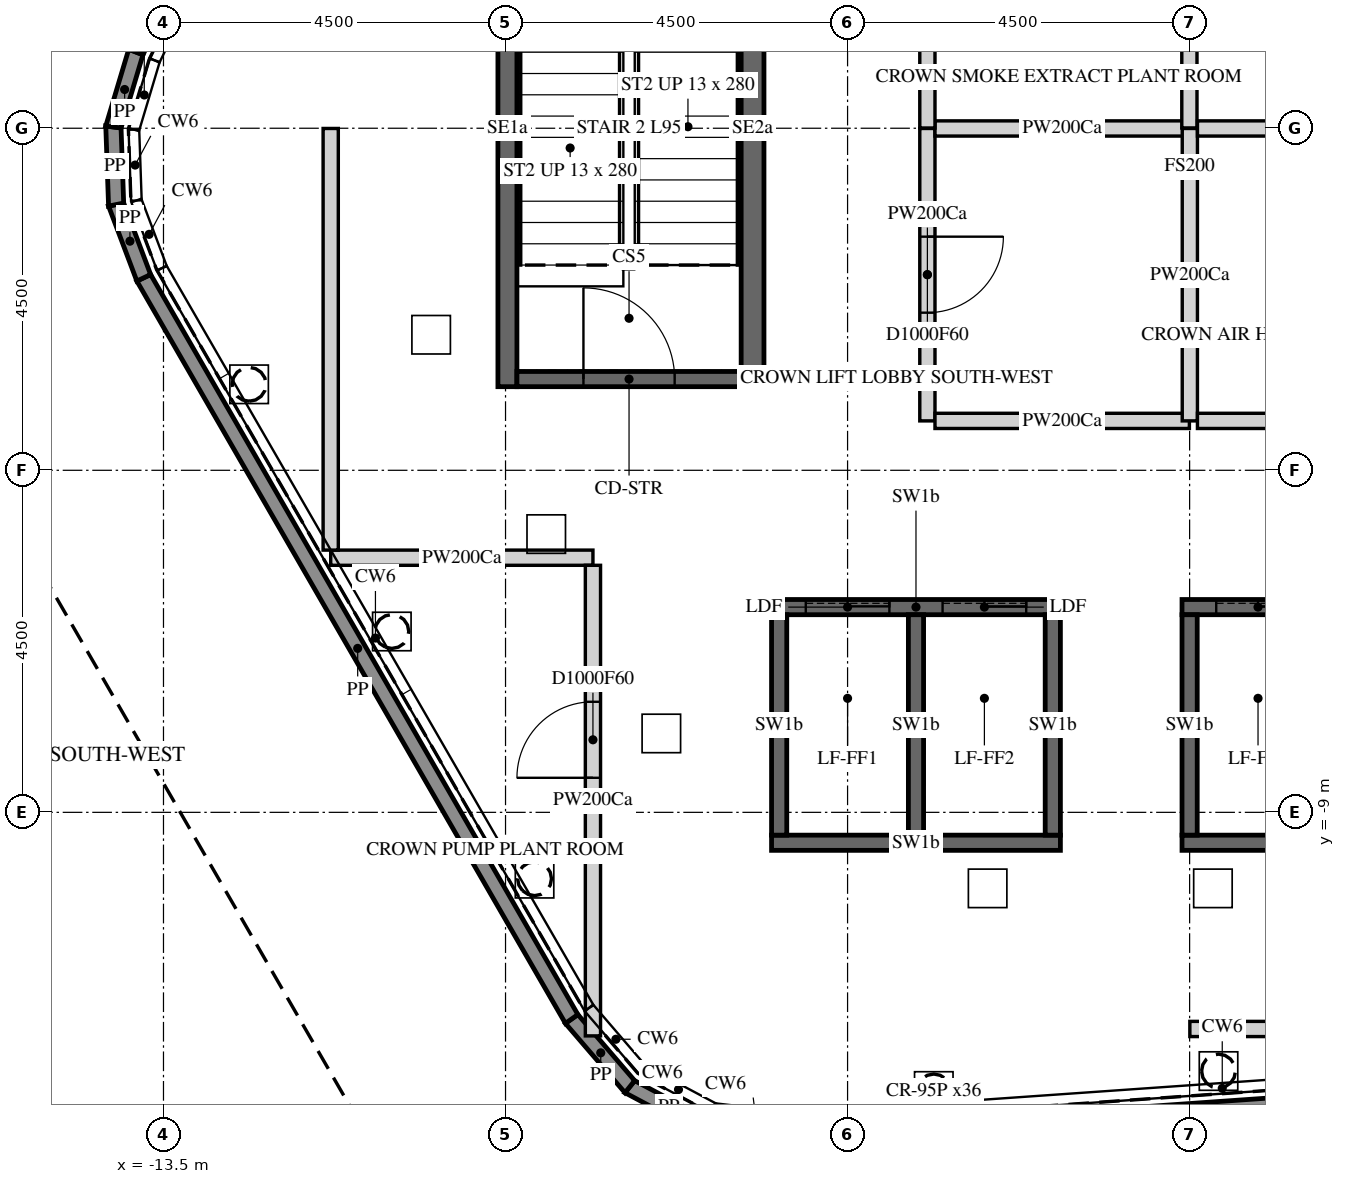
"""IFC4 building model, lengths in metres.
Left out: names, types, materials, properties, quantities, classifications, styles, units other than length and angle.
Written with IfcOpenShell. Run it as: python <this file> out.ifc"""

import sys

from ifc_helpers import new_model, si_unit, direction, frame, frame_2d, origin, place, context, subcontext, project, spatial, polyline, rectangle, outline, extrude, element, fill, save


model = new_model("IFC4")
c1 = context("Model", 3, precision=1e-05, world=origin(), true_north=direction((0.0, 1.0)))
c2 = subcontext(c1, "Body", "Model", "MODEL_VIEW")
j1 = project(units=[si_unit("LENGTHUNIT", "METRE"), si_unit("PLANEANGLEUNIT", "RADIAN")], contexts=[c1])
p1 = place(None, origin())
s1 = spatial("IfcSite", under=j1, at=p1, CompositionType="ELEMENT")
p2 = place(p1, origin())
s2 = spatial("IfcBuilding", under=s1, at=p2, CompositionType="ELEMENT")
p3 = place(p2, frame((0.0, 0.0, 401.7)))
s3 = spatial("IfcBuildingStorey", under=s2, at=p3, CompositionType="ELEMENT", Elevation=401.7)
p4 = place(p3, frame((6.063, -12.508, 4.5), z_axis=(0.0, 0.0, 1.0), x_axis=(-0.997564024583, -0.069756840932, 0.0)))
e1 = element("IfcWall", 1, at=p4, inside=s3, PredefinedType="PARAPET", context=c2, shape_type="SweptSolid", body=[
    extrude(outline(polyline([(0.008, -0.1), (11.25, -0.1), (11.268, 0.1), (-0.008, 0.1), (0.008, -0.1)])), origin(), (0.0, 0.0, 1.0), 1.1),
])
p5 = place(p3, frame((-6.335, -13.156, 4.5), z_axis=(0.0, 0.0, 1.0), x_axis=(-0.88296107381, 0.469446207926, 0.0)))
e2 = element("IfcWall", 2, at=p5, inside=s3, PredefinedType="PARAPET", context=c2, shape_type="SweptSolid", body=[
    extrude(outline(polyline([(0.019, -0.1), (1.147, -0.1), (1.184, 0.1), (-0.019, 0.1), (0.019, -0.1)])), origin(), (0.0, 0.0, 1.0), 1.1),
])
p6 = place(p3, frame((-7.365, -12.609, 4.5), z_axis=(0.0, 0.0, 1.0), x_axis=(-0.651680826734, 0.758493309177, 0.0)))
e3 = element("IfcWall", 3, at=p6, inside=s3, PredefinedType="PARAPET", context=c2, shape_type="SweptSolid", body=[
    extrude(outline(polyline([(0.019, -0.1), (1.166, -0.1), (1.184, 0.1), (-0.019, 0.1), (0.019, -0.1)])), origin(), (0.0, 0.0, 1.0), 1.1),
])
p7 = place(p3, frame((-8.13, -11.718, 4.5), z_axis=(0.0, 0.0, 1.0), x_axis=(-0.500003376122, 0.866023454571, 0.0)))
e4 = element("IfcWall", 4, at=p7, inside=s3, PredefinedType="PARAPET", context=c2, shape_type="SweptSolid", body=[
    extrude(outline(polyline([(0.009, -0.1), (11.251, -0.1), (11.267, 0.1), (-0.009, 0.1), (0.009, -0.1)])), origin(), (0.0, 0.0, 1.0), 1.1),
])
p8 = place(p3, frame((-13.76, -1.968, 4.5), z_axis=(0.0, 0.0, 1.0), x_axis=(-0.352837928655, 0.935684453276, 0.0)))
e5 = element("IfcWall", 5, at=p8, inside=s3, PredefinedType="PARAPET", context=c2, shape_type="SweptSolid", body=[
    extrude(outline(polyline([(0.008, -0.1), (1.013, -0.1), (1.046, 0.1), (-0.008, 0.1), (0.008, -0.1)])), origin(), (0.0, 0.0, 1.0), 1.1),
])
p9 = place(p3, frame((-14.123, -1.004, 4.5), z_axis=(0.0, 0.0, 1.0), x_axis=(-0.034898604471, 0.999390858176, 0.0)))
e6 = element("IfcWall", 6, at=p9, inside=s3, PredefinedType="PARAPET", context=c2, shape_type="SweptSolid", body=[
    extrude(outline(polyline([(0.016, -0.1), (1.005, -0.1), (1.038, 0.1), (-0.016, 0.1), (0.016, -0.1)])), origin(), (0.0, 0.0, 1.0), 1.1),
])
p10 = place(p3, frame((-14.159, 0.017, 4.5), z_axis=(0.0, 0.0, 1.0), x_axis=(0.286695156131, 0.958021861677, 0.0)))
e7 = element("IfcWall", 7, at=p10, inside=s3, PredefinedType="PARAPET", context=c2, shape_type="SweptSolid", body=[
    extrude(outline(polyline([(0.016, -0.1), (1.021, -0.1), (1.038, 0.1), (-0.016, 0.1), (0.016, -0.1)])), origin(), (0.0, 0.0, 1.0), 1.1),
])
p11 = place(p3, frame((-13.864, 1.003, 4.5), z_axis=(0.0, 0.0, 1.0), x_axis=(0.438379628459, 0.898789909463, 0.0)))
e8 = element("IfcWall", 8, at=p11, inside=s3, PredefinedType="PARAPET", context=c2, shape_type="SweptSolid", body=[
    extrude(outline(polyline([(0.008, -0.1), (11.25, -0.1), (11.269, 0.1), (-0.008, 0.1), (0.008, -0.1)])), origin(), (0.0, 0.0, 1.0), 1.1),
])
p12 = place(p3, frame((-5.5, -6.3, -0.2), z_axis=(0.0, 0.0, 1.0), x_axis=(1.0, 0.0, 0.0)))
e9 = element("IfcWall", 9, at=p12, inside=s3, PredefinedType="SHEAR", context=c2, shape_type="SweptSolid", body=[
    extrude(rectangle(XDim=3.8, YDim=0.2, at=frame_2d((1.9, 0.0))), origin(), (0.0, 0.0, 1.0), 4.5),
])
p13 = place(p12, frame((0.45, 0.0, 0.2)))
e10 = element("IfcOpeningElement", 10, at=p13, cuts=e9, PredefinedType="OPENING", context=c2, shape_type="SweptSolid", body=[
    extrude(rectangle(XDim=1.1, YDim=2.1, at=frame_2d((0.55, 1.05))), frame((0.0, 0.11, 0.0), z_axis=(0.0, -1.0, 0.0), x_axis=(1.0, 0.0, 0.0)), (0.0, 0.0, 1.0), 0.22),
])
p14 = place(p12, frame((2.25, 0.0, 0.2)))
e11 = element("IfcOpeningElement", 11, at=p14, cuts=e9, PredefinedType="OPENING", context=c2, shape_type="SweptSolid", body=[
    extrude(rectangle(XDim=1.1, YDim=2.1, at=frame_2d((0.55, 1.05))), frame((0.0, 0.11, 0.0), z_axis=(0.0, -1.0, 0.0), x_axis=(1.0, 0.0, 0.0)), (0.0, 0.0, 1.0), 0.22),
])
p15 = place(p3, frame((-5.5, -9.4, -0.2), z_axis=(0.0, 0.0, 1.0), x_axis=(1.0, 0.0, 0.0)))
e12 = element("IfcWall", 12, at=p15, inside=s3, PredefinedType="SHEAR", context=c2, shape_type="SweptSolid", body=[
    extrude(rectangle(XDim=3.8, YDim=0.2, at=frame_2d((1.9, 0.0))), origin(), (0.0, 0.0, 1.0), 4.5),
])
for number, where, z_axis, x_axis in (
    (13, (-5.4, -9.3, -0.2), (0.0, 0.0, 1.0), (0.0, 1.0, 0.0)),
    (14, (-3.6, -9.3, -0.2), (0.0, 0.0, 1.0), (0.0, 1.0, 0.0)),
    (15, (-1.8, -9.3, -0.2), (0.0, 0.0, 1.0), (0.0, 1.0, 0.0)),
):
    element("IfcWall", number, at=place(p3, frame(where, z_axis=z_axis, x_axis=x_axis)), inside=s3, PredefinedType="SHEAR", context=c2, shape_type="SweptSolid", body=[
        extrude(rectangle(XDim=2.9, YDim=0.2, at=frame_2d((1.45, 0.0))), origin(), (0.0, 0.0, 1.0), 4.5),
    ])
p16 = place(p3, frame((-0.1, -6.3, -0.2), z_axis=(0.0, 0.0, 1.0), x_axis=(1.0, 0.0, 0.0)))
e16 = element("IfcWall", 16, at=p16, inside=s3, PredefinedType="SHEAR", context=c2, shape_type="SweptSolid", body=[
    extrude(rectangle(XDim=2.0, YDim=0.2, at=frame_2d((1.0, 0.0))), origin(), (0.0, 0.0, 1.0), 4.5),
])
p17 = place(p16, frame((0.45, 0.0, 0.2)))
e17 = element("IfcOpeningElement", 17, at=p17, cuts=e16, PredefinedType="OPENING", context=c2, shape_type="SweptSolid", body=[
    extrude(rectangle(XDim=1.1, YDim=2.1, at=frame_2d((0.55, 1.05))), frame((0.0, 0.11, 0.0), z_axis=(0.0, -1.0, 0.0), x_axis=(1.0, 0.0, 0.0)), (0.0, 0.0, 1.0), 0.22),
])
p18 = place(p3, frame((-0.1, -9.4, -0.2), z_axis=(0.0, 0.0, 1.0), x_axis=(1.0, 0.0, 0.0)))
e18 = element("IfcWall", 18, at=p18, inside=s3, PredefinedType="SHEAR", context=c2, shape_type="SweptSolid", body=[
    extrude(rectangle(XDim=2.0, YDim=0.2, at=frame_2d((1.0, 0.0))), origin(), (0.0, 0.0, 1.0), 4.5),
])
p19 = place(p3, frame((0.0, -9.3, -0.2), z_axis=(0.0, 0.0, 1.0), x_axis=(0.0, 1.0, 0.0)))
e19 = element("IfcWall", 19, at=p19, inside=s3, PredefinedType="SHEAR", context=c2, shape_type="SweptSolid", body=[
    extrude(rectangle(XDim=2.9, YDim=0.2, at=frame_2d((1.45, 0.0))), origin(), (0.0, 0.0, 1.0), 4.5),
])
p20 = place(p3, frame((-5.75, -3.4, -0.2), z_axis=(0.0, 0.0, 1.0), x_axis=(0.0, 1.0, 0.0)))
e20 = element("IfcWall", 20, at=p20, inside=s3, PredefinedType="SHEAR", context=c2, shape_type="SweptSolid", body=[
    extrude(rectangle(XDim=6.8, YDim=0.3, at=frame_2d((3.4, 0.0))), origin(), (0.0, 0.0, 1.0), 4.5),
])
p21 = place(p3, frame((-8.975, -3.4, -0.2), z_axis=(0.0, 0.0, 1.0), x_axis=(0.0, 1.0, 0.0)))
e21 = element("IfcWall", 21, at=p21, inside=s3, PredefinedType="SHEAR", context=c2, shape_type="SweptSolid", body=[
    extrude(rectangle(XDim=6.8, YDim=0.25, at=frame_2d((3.4, 0.0))), origin(), (0.0, 0.0, 1.0), 4.5),
])
p22 = place(p3, frame((-8.85, -3.3, -0.2), z_axis=(0.0, 0.0, 1.0), x_axis=(1.0, 0.0, 0.0)))
e22 = element("IfcWall", 22, at=p22, inside=s3, PredefinedType="SHEAR", context=c2, shape_type="SweptSolid", body=[
    extrude(rectangle(XDim=2.95, YDim=0.2, at=frame_2d((1.475, 0.0))), origin(), (0.0, 0.0, 1.0), 4.5),
])
p23 = place(p22, frame((0.875, 0.0, 0.2)))
e23 = element("IfcOpeningElement", 23, at=p23, cuts=e22, PredefinedType="OPENING", context=c2, shape_type="SweptSolid", body=[
    extrude(rectangle(XDim=1.2, YDim=2.4, at=frame_2d((0.6, 1.2))), frame((0.0, 0.11, 0.0), z_axis=(0.0, -1.0, 0.0), x_axis=(1.0, 0.0, 0.0)), (0.0, 0.0, 1.0), 0.22),
])
p24 = place(p3, frame((-11.3, -5.65, 0.0), z_axis=(0.0, 0.0, 1.0), x_axis=(1.0, 0.0, 0.0)))
e24 = element("IfcWall", 24, at=p24, inside=s3, PredefinedType="PARTITIONING", context=c2, shape_type="SweptSolid", body=[
    extrude(rectangle(XDim=3.45, YDim=0.2, at=frame_2d((1.725, 0.0))), origin(), (0.0, 0.0, 1.0), 4.3),
])
p25 = place(p3, frame((-11.3, -0.003, 0.0), z_axis=(0.0, 0.0, 1.0), x_axis=(0.0, -1.0, 0.0)))
e25 = element("IfcWall", 25, at=p25, inside=s3, PredefinedType="PARTITIONING", context=c2, shape_type="SweptSolid", body=[
    extrude(rectangle(XDim=5.547, YDim=0.2, at=frame_2d((2.773, 0.0))), origin(), (0.0, 0.0, 1.0), 4.3),
])
p26 = place(p3, frame((-7.85, -11.941, 0.0), z_axis=(0.0, 0.0, 1.0), x_axis=(0.0, 1.0, 0.0)))
e26 = element("IfcWall", 26, at=p26, inside=s3, PredefinedType="PARTITIONING", context=c2, shape_type="SweptSolid", body=[
    extrude(rectangle(XDim=6.191, YDim=0.2, at=frame_2d((3.095, 0.0))), origin(), (0.0, 0.0, 1.0), 4.3),
])
p27 = place(p26, frame((3.396, 0.0, 0.0)))
e27 = element("IfcOpeningElement", 27, at=p27, cuts=e26, PredefinedType="OPENING", context=c2, shape_type="SweptSolid", body=[
    extrude(rectangle(XDim=1.0, YDim=2.1, at=frame_2d((0.5, 1.05))), frame((0.0, 0.11, 0.0), z_axis=(0.0, -1.0, 0.0), x_axis=(1.0, 0.0, 0.0)), (0.0, 0.0, 1.0), 0.22),
])
p28 = place(p3, frame((-3.45, -0.003, 0.0), z_axis=(0.0, 0.0, 1.0), x_axis=(0.0, -1.0, 0.0)))
e28 = element("IfcWall", 28, at=p28, inside=s3, PredefinedType="PARTITIONING", context=c2, shape_type="SweptSolid", body=[
    extrude(rectangle(XDim=3.847, YDim=0.2, at=frame_2d((1.924, 0.0))), origin(), (0.0, 0.0, 1.0), 4.3),
])
p29 = place(p28, frame((1.424, 0.0, 0.0)))
e29 = element("IfcOpeningElement", 29, at=p29, cuts=e28, PredefinedType="OPENING", context=c2, shape_type="SweptSolid", body=[
    extrude(rectangle(XDim=1.0, YDim=2.1, at=frame_2d((0.5, 1.05))), frame((0.0, 0.11, 0.0), z_axis=(0.0, -1.0, 0.0), x_axis=(1.0, 0.0, 0.0)), (0.0, 0.0, 1.0), 0.22),
])
p30 = place(p3, frame((-3.35, -0.003, 0.0), z_axis=(0.0, 0.0, 1.0), x_axis=(1.0, 0.0, 0.0)))
e30 = element("IfcWall", 30, at=p30, inside=s3, PredefinedType="PARTITIONING", context=c2, shape_type="SweptSolid", body=[
    extrude(rectangle(XDim=3.347, YDim=0.2, at=frame_2d((1.674, 0.0))), origin(), (0.0, 0.0, 1.0), 4.3),
])
p31 = place(p3, frame((-3.45, 0.003, 0.0), z_axis=(0.0, 0.0, 1.0), x_axis=(0.0, 1.0, 0.0)))
e31 = element("IfcWall", 31, at=p31, inside=s3, PredefinedType="PARTITIONING", context=c2, shape_type="SweptSolid", body=[
    extrude(rectangle(XDim=5.647, YDim=0.2, at=frame_2d((2.823, 0.0))), origin(), (0.0, 0.0, 1.0), 4.3),
])
p32 = place(p3, frame((-0.003, -3.85, 0.0), z_axis=(0.0, 0.0, 1.0), x_axis=(-1.0, 0.0, 0.0)))
e32 = element("IfcWall", 32, at=p32, inside=s3, PredefinedType="PARTITIONING", context=c2, shape_type="SweptSolid", body=[
    extrude(rectangle(XDim=3.347, YDim=0.2, at=frame_2d((1.674, 0.0))), origin(), (0.0, 0.0, 1.0), 4.3),
])
p33 = place(p3, frame((-0.003, 12.9, 0.0), z_axis=(0.0, 0.0, 1.0), x_axis=(0.0, -1.0, 0.0)))
e33 = element("IfcWall", 33, at=p33, inside=s3, PredefinedType="PARTITIONING", context=c2, shape_type="SweptSolid", body=[
    extrude(rectangle(XDim=12.897, YDim=0.2, at=frame_2d((6.448, 0.0))), origin(), (0.0, 0.0, 1.0), 4.3),
])
p34 = place(p3, frame((0.003, -11.85, 0.0), z_axis=(0.0, 0.0, 1.0), x_axis=(1.0, 0.0, 0.0)))
e34 = element("IfcWall", 34, at=p34, inside=s3, PredefinedType="PARTITIONING", context=c2, shape_type="SweptSolid", body=[
    extrude(rectangle(XDim=4.247, YDim=0.2, at=frame_2d((2.124, 0.0))), origin(), (0.0, 0.0, 1.0), 4.3),
])
p35 = place(p3, frame((0.003, -3.85, 0.0), z_axis=(0.0, 0.0, 1.0), x_axis=(0.0, 1.0, 0.0)))
e35 = element("IfcWall", 35, at=p35, inside=s3, PredefinedType="PARTITIONING", context=c2, shape_type="SweptSolid", body=[
    extrude(rectangle(XDim=3.847, YDim=0.2, at=frame_2d((1.924, 0.0))), origin(), (0.0, 0.0, 1.0), 4.3),
])
for number, where, z_axis, x_axis in (
    (36, (0.103, -0.003, 0.0), (0.0, 0.0, 1.0), (1.0, 0.0, 0.0)),
    (37, (3.45, -3.85, 0.0), (0.0, 0.0, 1.0), (-1.0, 0.0, 0.0)),
):
    element("IfcWall", number, at=place(p3, frame(where, z_axis=z_axis, x_axis=x_axis)), inside=s3, PredefinedType="PARTITIONING", context=c2, shape_type="SweptSolid", body=[
        extrude(rectangle(XDim=3.347, YDim=0.2, at=frame_2d((1.673, 0.0))), origin(), (0.0, 0.0, 1.0), 4.3),
    ])
p36 = place(p23, origin())
e38 = element("IfcDoor", 38, at=p36, inside=s3, OperationType="SINGLE_SWING_LEFT", PredefinedType="DOOR", context=c2, shape_type="SweptSolid", body=[
    extrude(rectangle(XDim=1.2, YDim=2.4, at=frame_2d((0.6, 1.2))), frame((0.0, 0.025, 0.0), z_axis=(0.0, -1.0, 0.0), x_axis=(1.0, 0.0, 0.0)), (0.0, 0.0, 1.0), 0.05),
])
fill(e23, e38)
p37 = place(p13, origin())
e39 = element("IfcDoor", 39, at=p37, inside=s3, OperationType="SLIDING_TO_LEFT", PredefinedType="DOOR", context=c2, shape_type="SweptSolid", body=[
    extrude(rectangle(XDim=1.1, YDim=2.1, at=frame_2d((0.55, 1.05))), frame((0.0, 0.025, 0.0), z_axis=(0.0, -1.0, 0.0), x_axis=(1.0, 0.0, 0.0)), (0.0, 0.0, 1.0), 0.05),
])
fill(e10, e39)
p38 = place(p14, origin())
e40 = element("IfcDoor", 40, at=p38, inside=s3, OperationType="SLIDING_TO_LEFT", PredefinedType="DOOR", context=c2, shape_type="SweptSolid", body=[
    extrude(rectangle(XDim=1.1, YDim=2.1, at=frame_2d((0.55, 1.05))), frame((0.0, 0.025, 0.0), z_axis=(0.0, -1.0, 0.0), x_axis=(1.0, 0.0, 0.0)), (0.0, 0.0, 1.0), 0.05),
])
fill(e11, e40)
p39 = place(p17, origin())
e41 = element("IfcDoor", 41, at=p39, inside=s3, OperationType="SLIDING_TO_LEFT", PredefinedType="DOOR", context=c2, shape_type="SweptSolid", body=[
    extrude(rectangle(XDim=1.1, YDim=2.1, at=frame_2d((0.55, 1.05))), frame((0.0, 0.025, 0.0), z_axis=(0.0, -1.0, 0.0), x_axis=(1.0, 0.0, 0.0)), (0.0, 0.0, 1.0), 0.05),
])
fill(e17, e41)
p40 = place(p27, origin())
e42 = element("IfcDoor", 42, at=p40, inside=s3, OperationType="SINGLE_SWING_RIGHT", PredefinedType="DOOR", context=c2, shape_type="SweptSolid", body=[
    extrude(rectangle(XDim=1.0, YDim=2.1, at=frame_2d((0.5, 1.05))), frame((0.0, 0.025, 0.0), z_axis=(0.0, -1.0, 0.0), x_axis=(1.0, 0.0, 0.0)), (0.0, 0.0, 1.0), 0.05),
])
fill(e27, e42)
p41 = place(p29, origin())
e43 = element("IfcDoor", 43, at=p41, inside=s3, OperationType="SINGLE_SWING_LEFT", PredefinedType="DOOR", context=c2, shape_type="SweptSolid", body=[
    extrude(rectangle(XDim=1.0, YDim=2.1, at=frame_2d((0.5, 1.05))), frame((0.0, 0.025, 0.0), z_axis=(0.0, -1.0, 0.0), x_axis=(1.0, 0.0, 0.0)), (0.0, 0.0, 1.0), 0.05),
])
fill(e29, e43)
save(model, sys.argv[1])
